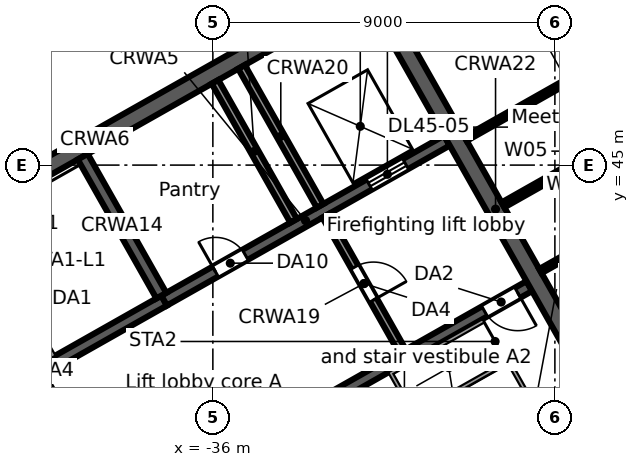
"""IFC4 building model, lengths in metres.
Left out: names, types, materials, properties, quantities, classifications, styles, units other than length and angle.
Written with IfcOpenShell. Run it as: python <this file> out.ifc"""

import sys

from ifc_helpers import new_model, si_unit, direction, frame, frame_2d, origin, place, context, subcontext, project, spatial, rectangle, extrude, element, fill, save


model = new_model("IFC4")
c1 = context("Model", 3, precision=1e-05, world=origin(), true_north=direction((0.0, 1.0)))
c2 = subcontext(c1, "Body", "Model", "MODEL_VIEW")
j1 = project(units=[si_unit("LENGTHUNIT", "METRE"), si_unit("PLANEANGLEUNIT", "RADIAN")], contexts=[c1])
p1 = place(None, origin())
s1 = spatial("IfcSite", under=j1, at=p1, CompositionType="ELEMENT")
p2 = place(p1, origin())
s2 = spatial("IfcBuilding", under=s1, at=p2, CompositionType="ELEMENT")
p3 = place(p2, frame((0.0, 0.0, 207.5)))
s3 = spatial("IfcBuildingStorey", under=s2, at=p3, CompositionType="ELEMENT", Elevation=207.5)
p4 = place(p3, frame((-0.046, 47.974, 0.0), z_axis=(0.0, 0.0, 1.0), x_axis=(-0.870356579543, -0.492421998337, 0.0)))
e1 = element("IfcWall", 1, at=p4, inside=s3, PredefinedType="STANDARD", context=c2, shape_type="SweptSolid", body=[
    extrude(rectangle(XDim=43.754, YDim=0.25, at=frame_2d((21.877, 0.0))), origin(), (0.0, 0.0, 1.0), 3.62),
])
p5 = place(p4, frame((41.061, 0.0, 0.8)))
e2 = element("IfcOpeningElement", 2, at=p5, cuts=e1, PredefinedType="OPENING", context=c2, shape_type="SweptSolid", body=[
    extrude(rectangle(XDim=2.4, YDim=2.2, at=frame_2d((1.2, 1.1))), frame((0.0, 0.135, 0.0), z_axis=(0.0, -1.0, 0.0), x_axis=(1.0, 0.0, 0.0)), (0.0, 0.0, 1.0), 0.27),
])
p6 = place(p4, frame((38.443, 0.0, 0.0)))
e3 = element("IfcOpeningElement", 3, at=p6, cuts=e1, PredefinedType="OPENING", context=c2, shape_type="SweptSolid", body=[
    extrude(rectangle(XDim=1.8, YDim=2.4, at=frame_2d((0.9, 1.2))), frame((0.0, 0.135, 0.0), z_axis=(0.0, -1.0, 0.0), x_axis=(1.0, 0.0, 0.0)), (0.0, 0.0, 1.0), 0.27),
])
p7 = place(p4, frame((35.225, 0.0, 0.8)))
e4 = element("IfcOpeningElement", 4, at=p7, cuts=e1, PredefinedType="OPENING", context=c2, shape_type="SweptSolid", body=[
    extrude(rectangle(XDim=2.4, YDim=2.2, at=frame_2d((1.2, 1.1))), frame((0.0, 0.135, 0.0), z_axis=(0.0, -1.0, 0.0), x_axis=(1.0, 0.0, 0.0)), (0.0, 0.0, 1.0), 0.27),
])
p8 = place(p4, frame((32.307, 0.0, 0.8)))
e5 = element("IfcOpeningElement", 5, at=p8, cuts=e1, PredefinedType="OPENING", context=c2, shape_type="SweptSolid", body=[
    extrude(rectangle(XDim=2.4, YDim=2.2, at=frame_2d((1.2, 1.1))), frame((0.0, 0.135, 0.0), z_axis=(0.0, -1.0, 0.0), x_axis=(1.0, 0.0, 0.0)), (0.0, 0.0, 1.0), 0.27),
])
p9 = place(p4, frame((29.688, 0.0, 0.0)))
e6 = element("IfcOpeningElement", 6, at=p9, cuts=e1, PredefinedType="OPENING", context=c2, shape_type="SweptSolid", body=[
    extrude(rectangle(XDim=1.8, YDim=2.4, at=frame_2d((0.9, 1.2))), frame((0.0, 0.135, 0.0), z_axis=(0.0, -1.0, 0.0), x_axis=(1.0, 0.0, 0.0)), (0.0, 0.0, 1.0), 0.27),
])
p10 = place(p4, frame((26.47, 0.0, 0.8)))
e7 = element("IfcOpeningElement", 7, at=p10, cuts=e1, PredefinedType="OPENING", context=c2, shape_type="SweptSolid", body=[
    extrude(rectangle(XDim=2.4, YDim=2.2, at=frame_2d((1.2, 1.1))), frame((0.0, 0.135, 0.0), z_axis=(0.0, -1.0, 0.0), x_axis=(1.0, 0.0, 0.0)), (0.0, 0.0, 1.0), 0.27),
])
p11 = place(p4, frame((23.552, 0.0, 0.8)))
e8 = element("IfcOpeningElement", 8, at=p11, cuts=e1, PredefinedType="OPENING", context=c2, shape_type="SweptSolid", body=[
    extrude(rectangle(XDim=2.4, YDim=2.2, at=frame_2d((1.2, 1.1))), frame((0.0, 0.135, 0.0), z_axis=(0.0, -1.0, 0.0), x_axis=(1.0, 0.0, 0.0)), (0.0, 0.0, 1.0), 0.27),
])
p12 = place(p4, frame((20.934, 0.0, 0.0)))
e9 = element("IfcOpeningElement", 9, at=p12, cuts=e1, PredefinedType="OPENING", context=c2, shape_type="SweptSolid", body=[
    extrude(rectangle(XDim=1.8, YDim=2.4, at=frame_2d((0.9, 1.2))), frame((0.0, 0.135, 0.0), z_axis=(0.0, -1.0, 0.0), x_axis=(1.0, 0.0, 0.0)), (0.0, 0.0, 1.0), 0.27),
])
p13 = place(p4, frame((17.716, 0.0, 0.8)))
e10 = element("IfcOpeningElement", 10, at=p13, cuts=e1, PredefinedType="OPENING", context=c2, shape_type="SweptSolid", body=[
    extrude(rectangle(XDim=2.4, YDim=2.2, at=frame_2d((1.2, 1.1))), frame((0.0, 0.135, 0.0), z_axis=(0.0, -1.0, 0.0), x_axis=(1.0, 0.0, 0.0)), (0.0, 0.0, 1.0), 0.27),
])
p14 = place(p4, frame((14.798, 0.0, 0.8)))
e11 = element("IfcOpeningElement", 11, at=p14, cuts=e1, PredefinedType="OPENING", context=c2, shape_type="SweptSolid", body=[
    extrude(rectangle(XDim=2.4, YDim=2.2, at=frame_2d((1.2, 1.1))), frame((0.0, 0.135, 0.0), z_axis=(0.0, -1.0, 0.0), x_axis=(1.0, 0.0, 0.0)), (0.0, 0.0, 1.0), 0.27),
])
p15 = place(p4, frame((12.179, 0.0, 0.0)))
e12 = element("IfcOpeningElement", 12, at=p15, cuts=e1, PredefinedType="OPENING", context=c2, shape_type="SweptSolid", body=[
    extrude(rectangle(XDim=1.8, YDim=2.4, at=frame_2d((0.9, 1.2))), frame((0.0, 0.135, 0.0), z_axis=(0.0, -1.0, 0.0), x_axis=(1.0, 0.0, 0.0)), (0.0, 0.0, 1.0), 0.27),
])
p16 = place(p4, frame((8.961, 0.0, 0.8)))
e13 = element("IfcOpeningElement", 13, at=p16, cuts=e1, PredefinedType="OPENING", context=c2, shape_type="SweptSolid", body=[
    extrude(rectangle(XDim=2.4, YDim=2.2, at=frame_2d((1.2, 1.1))), frame((0.0, 0.135, 0.0), z_axis=(0.0, -1.0, 0.0), x_axis=(1.0, 0.0, 0.0)), (0.0, 0.0, 1.0), 0.27),
])
p17 = place(p4, frame((6.043, 0.0, 0.8)))
e14 = element("IfcOpeningElement", 14, at=p17, cuts=e1, PredefinedType="OPENING", context=c2, shape_type="SweptSolid", body=[
    extrude(rectangle(XDim=2.4, YDim=2.2, at=frame_2d((1.2, 1.1))), frame((0.0, 0.135, 0.0), z_axis=(0.0, -1.0, 0.0), x_axis=(1.0, 0.0, 0.0)), (0.0, 0.0, 1.0), 0.27),
])
p18 = place(p4, frame((3.425, 0.0, 0.0)))
e15 = element("IfcOpeningElement", 15, at=p18, cuts=e1, PredefinedType="OPENING", context=c2, shape_type="SweptSolid", body=[
    extrude(rectangle(XDim=1.8, YDim=2.4, at=frame_2d((0.9, 1.2))), frame((0.0, 0.135, 0.0), z_axis=(0.0, -1.0, 0.0), x_axis=(1.0, 0.0, 0.0)), (0.0, 0.0, 1.0), 0.27),
])
p19 = place(p4, frame((0.207, 0.0, 0.8)))
e16 = element("IfcOpeningElement", 16, at=p19, cuts=e1, PredefinedType="OPENING", context=c2, shape_type="SweptSolid", body=[
    extrude(rectangle(XDim=2.4, YDim=2.2, at=frame_2d((1.2, 1.1))), frame((0.0, 0.135, 0.0), z_axis=(0.0, -1.0, 0.0), x_axis=(1.0, 0.0, 0.0)), (0.0, 0.0, 1.0), 0.27),
])
p20 = place(p3, frame((-58.732, 38.771, 0.0), z_axis=(0.0, 0.0, 1.0), x_axis=(0.870354824205, 0.492425100887, 0.0)))
e17 = element("IfcWall", 17, at=p20, inside=s3, PredefinedType="STANDARD", context=c2, shape_type="SweptSolid", body=[
    extrude(rectangle(XDim=64.006, YDim=0.25, at=frame_2d((32.003, 0.0))), origin(), (0.0, 0.0, 1.0), 3.62),
])
p21 = place(p20, frame((61.259, 0.0, 0.8)))
e18 = element("IfcOpeningElement", 18, at=p21, cuts=e17, PredefinedType="OPENING", context=c2, shape_type="SweptSolid", body=[
    extrude(rectangle(XDim=2.4, YDim=2.2, at=frame_2d((1.2, 1.1))), frame((0.0, 0.135, 0.0), z_axis=(0.0, -1.0, 0.0), x_axis=(1.0, 0.0, 0.0)), (0.0, 0.0, 1.0), 0.27),
])
p22 = place(p20, frame((58.216, 0.0, 0.8)))
e19 = element("IfcOpeningElement", 19, at=p22, cuts=e17, PredefinedType="OPENING", context=c2, shape_type="SweptSolid", body=[
    extrude(rectangle(XDim=2.4, YDim=2.2, at=frame_2d((1.2, 1.1))), frame((0.0, 0.135, 0.0), z_axis=(0.0, -1.0, 0.0), x_axis=(1.0, 0.0, 0.0)), (0.0, 0.0, 1.0), 0.27),
])
p23 = place(p20, frame((55.173, 0.0, 0.8)))
e20 = element("IfcOpeningElement", 20, at=p23, cuts=e17, PredefinedType="OPENING", context=c2, shape_type="SweptSolid", body=[
    extrude(rectangle(XDim=2.4, YDim=2.2, at=frame_2d((1.2, 1.1))), frame((0.0, 0.135, 0.0), z_axis=(0.0, -1.0, 0.0), x_axis=(1.0, 0.0, 0.0)), (0.0, 0.0, 1.0), 0.27),
])
p24 = place(p20, frame((52.129, 0.0, 0.8)))
e21 = element("IfcOpeningElement", 21, at=p24, cuts=e17, PredefinedType="OPENING", context=c2, shape_type="SweptSolid", body=[
    extrude(rectangle(XDim=2.4, YDim=2.2, at=frame_2d((1.2, 1.1))), frame((0.0, 0.135, 0.0), z_axis=(0.0, -1.0, 0.0), x_axis=(1.0, 0.0, 0.0)), (0.0, 0.0, 1.0), 0.27),
])
p25 = place(p20, frame((49.086, 0.0, 0.8)))
e22 = element("IfcOpeningElement", 22, at=p25, cuts=e17, PredefinedType="OPENING", context=c2, shape_type="SweptSolid", body=[
    extrude(rectangle(XDim=2.4, YDim=2.2, at=frame_2d((1.2, 1.1))), frame((0.0, 0.135, 0.0), z_axis=(0.0, -1.0, 0.0), x_axis=(1.0, 0.0, 0.0)), (0.0, 0.0, 1.0), 0.27),
])
p26 = place(p20, frame((46.043, 0.0, 0.8)))
e23 = element("IfcOpeningElement", 23, at=p26, cuts=e17, PredefinedType="OPENING", context=c2, shape_type="SweptSolid", body=[
    extrude(rectangle(XDim=2.4, YDim=2.2, at=frame_2d((1.2, 1.1))), frame((0.0, 0.135, 0.0), z_axis=(0.0, -1.0, 0.0), x_axis=(1.0, 0.0, 0.0)), (0.0, 0.0, 1.0), 0.27),
])
p27 = place(p20, frame((43.0, 0.0, 0.8)))
e24 = element("IfcOpeningElement", 24, at=p27, cuts=e17, PredefinedType="OPENING", context=c2, shape_type="SweptSolid", body=[
    extrude(rectangle(XDim=2.4, YDim=2.2, at=frame_2d((1.2, 1.1))), frame((0.0, 0.135, 0.0), z_axis=(0.0, -1.0, 0.0), x_axis=(1.0, 0.0, 0.0)), (0.0, 0.0, 1.0), 0.27),
])
p28 = place(p20, frame((39.956, 0.0, 0.8)))
e25 = element("IfcOpeningElement", 25, at=p28, cuts=e17, PredefinedType="OPENING", context=c2, shape_type="SweptSolid", body=[
    extrude(rectangle(XDim=2.4, YDim=2.2, at=frame_2d((1.2, 1.1))), frame((0.0, 0.135, 0.0), z_axis=(0.0, -1.0, 0.0), x_axis=(1.0, 0.0, 0.0)), (0.0, 0.0, 1.0), 0.27),
])
p29 = place(p20, frame((36.913, 0.0, 0.8)))
e26 = element("IfcOpeningElement", 26, at=p29, cuts=e17, PredefinedType="OPENING", context=c2, shape_type="SweptSolid", body=[
    extrude(rectangle(XDim=2.4, YDim=2.2, at=frame_2d((1.2, 1.1))), frame((0.0, 0.135, 0.0), z_axis=(0.0, -1.0, 0.0), x_axis=(1.0, 0.0, 0.0)), (0.0, 0.0, 1.0), 0.27),
])
p30 = place(p20, frame((33.87, 0.0, 0.8)))
e27 = element("IfcOpeningElement", 27, at=p30, cuts=e17, PredefinedType="OPENING", context=c2, shape_type="SweptSolid", body=[
    extrude(rectangle(XDim=2.4, YDim=2.2, at=frame_2d((1.2, 1.1))), frame((0.0, 0.135, 0.0), z_axis=(0.0, -1.0, 0.0), x_axis=(1.0, 0.0, 0.0)), (0.0, 0.0, 1.0), 0.27),
])
p31 = place(p20, frame((30.826, 0.0, 0.8)))
e28 = element("IfcOpeningElement", 28, at=p31, cuts=e17, PredefinedType="OPENING", context=c2, shape_type="SweptSolid", body=[
    extrude(rectangle(XDim=2.4, YDim=2.2, at=frame_2d((1.2, 1.1))), frame((0.0, 0.135, 0.0), z_axis=(0.0, -1.0, 0.0), x_axis=(1.0, 0.0, 0.0)), (0.0, 0.0, 1.0), 0.27),
])
p32 = place(p20, frame((27.783, 0.0, 0.8)))
e29 = element("IfcOpeningElement", 29, at=p32, cuts=e17, PredefinedType="OPENING", context=c2, shape_type="SweptSolid", body=[
    extrude(rectangle(XDim=2.4, YDim=2.2, at=frame_2d((1.2, 1.1))), frame((0.0, 0.135, 0.0), z_axis=(0.0, -1.0, 0.0), x_axis=(1.0, 0.0, 0.0)), (0.0, 0.0, 1.0), 0.27),
])
p33 = place(p20, frame((24.74, 0.0, 0.8)))
e30 = element("IfcOpeningElement", 30, at=p33, cuts=e17, PredefinedType="OPENING", context=c2, shape_type="SweptSolid", body=[
    extrude(rectangle(XDim=2.4, YDim=2.2, at=frame_2d((1.2, 1.1))), frame((0.0, 0.135, 0.0), z_axis=(0.0, -1.0, 0.0), x_axis=(1.0, 0.0, 0.0)), (0.0, 0.0, 1.0), 0.27),
])
p34 = place(p20, frame((21.696, 0.0, 0.8)))
e31 = element("IfcOpeningElement", 31, at=p34, cuts=e17, PredefinedType="OPENING", context=c2, shape_type="SweptSolid", body=[
    extrude(rectangle(XDim=2.4, YDim=2.2, at=frame_2d((1.2, 1.1))), frame((0.0, 0.135, 0.0), z_axis=(0.0, -1.0, 0.0), x_axis=(1.0, 0.0, 0.0)), (0.0, 0.0, 1.0), 0.27),
])
p35 = place(p20, frame((18.653, 0.0, 0.8)))
e32 = element("IfcOpeningElement", 32, at=p35, cuts=e17, PredefinedType="OPENING", context=c2, shape_type="SweptSolid", body=[
    extrude(rectangle(XDim=2.4, YDim=2.2, at=frame_2d((1.2, 1.1))), frame((0.0, 0.135, 0.0), z_axis=(0.0, -1.0, 0.0), x_axis=(1.0, 0.0, 0.0)), (0.0, 0.0, 1.0), 0.27),
])
p36 = place(p20, frame((15.61, 0.0, 0.8)))
e33 = element("IfcOpeningElement", 33, at=p36, cuts=e17, PredefinedType="OPENING", context=c2, shape_type="SweptSolid", body=[
    extrude(rectangle(XDim=2.4, YDim=2.2, at=frame_2d((1.2, 1.1))), frame((0.0, 0.135, 0.0), z_axis=(0.0, -1.0, 0.0), x_axis=(1.0, 0.0, 0.0)), (0.0, 0.0, 1.0), 0.27),
])
p37 = place(p20, frame((12.567, 0.0, 0.8)))
e34 = element("IfcOpeningElement", 34, at=p37, cuts=e17, PredefinedType="OPENING", context=c2, shape_type="SweptSolid", body=[
    extrude(rectangle(XDim=2.4, YDim=2.2, at=frame_2d((1.2, 1.1))), frame((0.0, 0.135, 0.0), z_axis=(0.0, -1.0, 0.0), x_axis=(1.0, 0.0, 0.0)), (0.0, 0.0, 1.0), 0.27),
])
p38 = place(p20, frame((9.523, 0.0, 0.8)))
e35 = element("IfcOpeningElement", 35, at=p38, cuts=e17, PredefinedType="OPENING", context=c2, shape_type="SweptSolid", body=[
    extrude(rectangle(XDim=2.4, YDim=2.2, at=frame_2d((1.2, 1.1))), frame((0.0, 0.135, 0.0), z_axis=(0.0, -1.0, 0.0), x_axis=(1.0, 0.0, 0.0)), (0.0, 0.0, 1.0), 0.27),
])
p39 = place(p20, frame((6.48, 0.0, 0.8)))
e36 = element("IfcOpeningElement", 36, at=p39, cuts=e17, PredefinedType="OPENING", context=c2, shape_type="SweptSolid", body=[
    extrude(rectangle(XDim=2.4, YDim=2.2, at=frame_2d((1.2, 1.1))), frame((0.0, 0.135, 0.0), z_axis=(0.0, -1.0, 0.0), x_axis=(1.0, 0.0, 0.0)), (0.0, 0.0, 1.0), 0.27),
])
p40 = place(p20, frame((3.437, 0.0, 0.8)))
e37 = element("IfcOpeningElement", 37, at=p40, cuts=e17, PredefinedType="OPENING", context=c2, shape_type="SweptSolid", body=[
    extrude(rectangle(XDim=2.4, YDim=2.2, at=frame_2d((1.2, 1.1))), frame((0.0, 0.135, 0.0), z_axis=(0.0, -1.0, 0.0), x_axis=(1.0, 0.0, 0.0)), (0.0, 0.0, 1.0), 0.27),
])
p41 = place(p20, frame((0.393, 0.0, 0.8)))
e38 = element("IfcOpeningElement", 38, at=p41, cuts=e17, PredefinedType="OPENING", context=c2, shape_type="SweptSolid", body=[
    extrude(rectangle(XDim=2.4, YDim=2.2, at=frame_2d((1.2, 1.1))), frame((0.0, 0.135, 0.0), z_axis=(0.0, -1.0, 0.0), x_axis=(1.0, 0.0, 0.0)), (0.0, 0.0, 1.0), 0.27),
])
p42 = place(p3, frame((-34.245, 38.097, 0.0), z_axis=(0.0, 0.0, 1.0), x_axis=(0.870360409231, 0.492415229297, 0.0)))
e39 = element("IfcWall", 39, at=p42, inside=s3, PredefinedType="SOLIDWALL", context=c2, shape_type="SweptSolid", body=[
    extrude(rectangle(XDim=7.55, YDim=0.3, at=frame_2d((3.775, 0.0))), origin(), (0.0, 0.0, 1.0), 3.62),
])
p43 = place(p42, frame((6.2, 0.0, 0.0)))
e40 = element("IfcOpeningElement", 40, at=p43, cuts=e39, PredefinedType="OPENING", context=c2, shape_type="SweptSolid", body=[
    extrude(rectangle(XDim=1.0, YDim=2.1, at=frame_2d((0.5, 1.05))), frame((0.0, 0.16, 0.0), z_axis=(0.0, -1.0, 0.0), x_axis=(1.0, 0.0, 0.0)), (0.0, 0.0, 1.0), 0.32),
])
p44 = place(p3, frame((-43.853, 37.717, 0.0), z_axis=(0.0, 0.0, 1.0), x_axis=(0.870360409231, 0.492415229297, 0.0)))
e41 = element("IfcWall", 41, at=p44, inside=s3, PredefinedType="SOLIDWALL", context=c2, shape_type="SweptSolid", body=[
    extrude(rectangle(XDim=7.55, YDim=0.3, at=frame_2d((3.775, 0.0))), origin(), (0.0, 0.0, 1.0), 3.62),
])
p45 = place(p44, frame((0.35, 0.0, 0.0)))
e42 = element("IfcOpeningElement", 42, at=p45, cuts=e41, PredefinedType="OPENING", context=c2, shape_type="SweptSolid", body=[
    extrude(rectangle(XDim=1.0, YDim=2.1, at=frame_2d((0.5, 1.05))), frame((0.0, 0.16, 0.0), z_axis=(0.0, -1.0, 0.0), x_axis=(1.0, 0.0, 0.0)), (0.0, 0.0, 1.0), 0.32),
])
p46 = place(p3, frame((-37.282, 41.435, 0.0), z_axis=(0.0, 0.0, 1.0), x_axis=(0.870352688754, 0.492428875248, 0.0)))
e43 = element("IfcWall", 43, at=p46, inside=s3, PredefinedType="SOLIDWALL", context=c2, shape_type="SweptSolid", body=[
    extrude(rectangle(XDim=8.55, YDim=0.3, at=frame_2d((4.275, 0.0))), origin(), (0.0, 0.0, 1.0), 3.62),
])
p47 = place(p46, frame((6.2, 0.0, 0.0)))
e44 = element("IfcOpeningElement", 44, at=p47, cuts=e43, PredefinedType="OPENING", context=c2, shape_type="SweptSolid", body=[
    extrude(rectangle(XDim=1.1, YDim=2.1, at=frame_2d((0.55, 1.05))), frame((0.0, 0.16, 0.0), z_axis=(0.0, -1.0, 0.0), x_axis=(1.0, 0.0, 0.0)), (0.0, 0.0, 1.0), 0.32),
])
p48 = place(p46, frame((1.55, 0.0, 0.0)))
e45 = element("IfcOpeningElement", 45, at=p48, cuts=e43, PredefinedType="OPENING", context=c2, shape_type="SweptSolid", body=[
    extrude(rectangle(XDim=0.9, YDim=2.1, at=frame_2d((0.45, 1.05))), frame((0.0, 0.16, 0.0), z_axis=(0.0, -1.0, 0.0), x_axis=(1.0, 0.0, 0.0)), (0.0, 0.0, 1.0), 0.32),
])
p49 = place(p3, frame((-46.498, 41.477, 0.0), z_axis=(0.0, 0.0, 1.0), x_axis=(0.870359753402, 0.492416388494, 0.0)))
e46 = element("IfcWall", 46, at=p49, inside=s3, PredefinedType="SOLIDWALL", context=c2, shape_type="SweptSolid", body=[
    extrude(rectangle(XDim=17.0, YDim=0.45, at=frame_2d((8.5, 0.0))), origin(), (0.0, 0.0, 1.0), 3.62),
])
p50 = place(p3, frame((-46.191, 41.392, 0.0), z_axis=(0.0, 0.0, 1.0), x_axis=(0.492421378713, -0.870356930107, 0.0)))
e47 = element("IfcWall", 47, at=p50, inside=s3, PredefinedType="SOLIDWALL", context=c2, shape_type="SweptSolid", body=[
    extrude(rectangle(XDim=13.1, YDim=0.45, at=frame_2d((6.55, 0.0))), origin(), (0.0, 0.0, 1.0), 3.62),
])
p51 = place(p3, frame((-40.516, 39.433, 0.0), z_axis=(0.0, 0.0, 1.0), x_axis=(0.492453559952, -0.87033872216, 0.0)))
e48 = element("IfcWall", 48, at=p51, inside=s3, PredefinedType="PARTITIONING", context=c2, shape_type="SweptSolid", body=[
    extrude(rectangle(XDim=4.1, YDim=0.2, at=frame_2d((2.05, 0.0))), origin(), (0.0, 0.0, 1.0), 3.62),
])
p52 = place(p51, frame((1.55, 0.0, 0.0)))
e49 = element("IfcOpeningElement", 49, at=p52, cuts=e48, PredefinedType="OPENING", context=c2, shape_type="SweptSolid", body=[
    extrude(rectangle(XDim=1.0, YDim=2.1, at=frame_2d((0.5, 1.05))), frame((0.0, 0.11, 0.0), z_axis=(0.0, -1.0, 0.0), x_axis=(1.0, 0.0, 0.0)), (0.0, 0.0, 1.0), 0.22),
])
p53 = place(p3, frame((-39.424, 45.22, 0.0), z_axis=(0.0, 0.0, 1.0), x_axis=(0.492409653846, -0.870363563575, 0.0)))
e50 = element("IfcWall", 50, at=p53, inside=s3, PredefinedType="SOLIDWALL", context=c2, shape_type="SweptSolid", body=[
    extrude(rectangle(XDim=4.2, YDim=0.3, at=frame_2d((2.1, 0.0))), origin(), (0.0, 0.0, 1.0), 3.62),
])
p54 = place(p3, frame((-35.943, 47.19, 0.0), z_axis=(0.0, 0.0, 1.0), x_axis=(0.492409653846, -0.870363563575, 0.0)))
e51 = element("IfcWall", 51, at=p54, inside=s3, PredefinedType="SOLIDWALL", context=c2, shape_type="SweptSolid", body=[
    extrude(rectangle(XDim=4.2, YDim=0.2, at=frame_2d((2.1, 0.0))), origin(), (0.0, 0.0, 1.0), 3.62),
])
p55 = place(p3, frame((-33.031, 43.667, 0.0), z_axis=(0.0, 0.0, 1.0), x_axis=(0.492408451753, -0.87036424366, 0.0)))
e52 = element("IfcWall", 52, at=p55, inside=s3, PredefinedType="PARTITIONING", context=c2, shape_type="SweptSolid", body=[
    extrude(rectangle(XDim=4.1, YDim=0.2, at=frame_2d((2.05, 0.0))), origin(), (0.0, 0.0, 1.0), 3.62),
])
p56 = place(p55, frame((1.55, 0.0, 0.0)))
e53 = element("IfcOpeningElement", 53, at=p56, cuts=e52, PredefinedType="OPENING", context=c2, shape_type="SweptSolid", body=[
    extrude(rectangle(XDim=1.0, YDim=2.1, at=frame_2d((0.5, 1.05))), frame((0.0, 0.11, 0.0), z_axis=(0.0, -1.0, 0.0), x_axis=(1.0, 0.0, 0.0)), (0.0, 0.0, 1.0), 0.22),
])
p57 = place(p3, frame((-35.246, 47.584, 0.0), z_axis=(0.0, 0.0, 1.0), x_axis=(0.492409653846, -0.870363563575, 0.0)))
e54 = element("IfcWall", 54, at=p57, inside=s3, PredefinedType="SOLIDWALL", context=c2, shape_type="SweptSolid", body=[
    extrude(rectangle(XDim=4.2, YDim=0.2, at=frame_2d((2.1, 0.0))), origin(), (0.0, 0.0, 1.0), 3.62),
])
p58 = place(p3, frame((-31.787, 49.542, 0.0), z_axis=(0.0, 0.0, 1.0), x_axis=(0.492421378713, -0.870356930107, 0.0)))
e55 = element("IfcWall", 55, at=p58, inside=s3, PredefinedType="SOLIDWALL", context=c2, shape_type="SweptSolid", body=[
    extrude(rectangle(XDim=13.1, YDim=0.45, at=frame_2d((6.55, 0.0))), origin(), (0.0, 0.0, 1.0), 3.62),
])
p59 = place(p3, frame((-29.35, 45.692, 0.0), z_axis=(0.0, 0.0, 1.0), x_axis=(0.870294630003, 0.492531478169, 0.0)))
e56 = element("IfcWall", 56, at=p59, inside=s3, PredefinedType="PARTITIONING", context=c2, shape_type="SweptSolid", body=[
    extrude(rectangle(XDim=5.75, YDim=0.125, at=frame_2d((2.875, 0.0))), origin(), (0.0, 0.0, 1.0), 3.62),
])
p60 = place(p3, frame((-28.366, 43.952, 0.0), z_axis=(0.0, 0.0, 1.0), x_axis=(0.870398309195, 0.492348233825, 0.0)))
e57 = element("IfcWall", 57, at=p60, inside=s3, PredefinedType="PARTITIONING", context=c2, shape_type="SweptSolid", body=[
    extrude(rectangle(XDim=5.75, YDim=0.15, at=frame_2d((2.875, 0.0))), origin(), (0.0, 0.0, 1.0), 2.892),
])
p61 = place(p3, frame((-27.381, 42.211, 0.0), z_axis=(0.0, 0.0, 1.0), x_axis=(0.870388475779, 0.492365617434, 0.0)))
e58 = element("IfcWall", 58, at=p61, inside=s3, PredefinedType="PARTITIONING", context=c2, shape_type="SweptSolid", body=[
    extrude(rectangle(XDim=3.0, YDim=0.125, at=frame_2d((1.5, 0.0))), origin(), (0.0, 0.0, 1.0), 2.892),
])
p62 = place(p47, origin())
e59 = element("IfcDoor", 59, at=p62, inside=s3, OperationType="DOUBLE_DOOR_SLIDING", PredefinedType="DOOR", context=c2, shape_type="SweptSolid", body=[
    extrude(rectangle(XDim=1.1, YDim=2.1, at=frame_2d((0.55, 1.05))), frame((0.0, 0.025, 0.0), z_axis=(0.0, -1.0, 0.0), x_axis=(1.0, 0.0, 0.0)), (0.0, 0.0, 1.0), 0.05),
])
fill(e44, e59)
p63 = place(p43, frame((1.0, 0.0, 0.0), z_axis=(0.0, 0.0, 1.0), x_axis=(-1.0, 0.0, 0.0)))
e60 = element("IfcDoor", 60, at=p63, inside=s3, OperationType="SINGLE_SWING_LEFT", PredefinedType="DOOR", context=c2, shape_type="SweptSolid", body=[
    extrude(rectangle(XDim=1.0, YDim=2.1, at=frame_2d((0.5, 1.05))), frame((0.0, 0.025, 0.0), z_axis=(0.0, -1.0, 0.0), x_axis=(1.0, 0.0, 0.0)), (0.0, 0.0, 1.0), 0.05),
])
fill(e40, e60)
p64 = place(p56, origin())
e61 = element("IfcDoor", 61, at=p64, inside=s3, OperationType="SINGLE_SWING_RIGHT", PredefinedType="DOOR", context=c2, shape_type="SweptSolid", body=[
    extrude(rectangle(XDim=1.0, YDim=2.1, at=frame_2d((0.5, 1.05))), frame((0.0, 0.025, 0.0), z_axis=(0.0, -1.0, 0.0), x_axis=(1.0, 0.0, 0.0)), (0.0, 0.0, 1.0), 0.05),
])
fill(e53, e61)
p65 = place(p48, origin())
e62 = element("IfcDoor", 62, at=p65, inside=s3, OperationType="SINGLE_SWING_LEFT", PredefinedType="DOOR", context=c2, shape_type="SweptSolid", body=[
    extrude(rectangle(XDim=0.9, YDim=2.1, at=frame_2d((0.45, 1.05))), frame((0.0, 0.025, 0.0), z_axis=(0.0, -1.0, 0.0), x_axis=(1.0, 0.0, 0.0)), (0.0, 0.0, 1.0), 0.05),
])
fill(e45, e62)
save(model, sys.argv[1])
